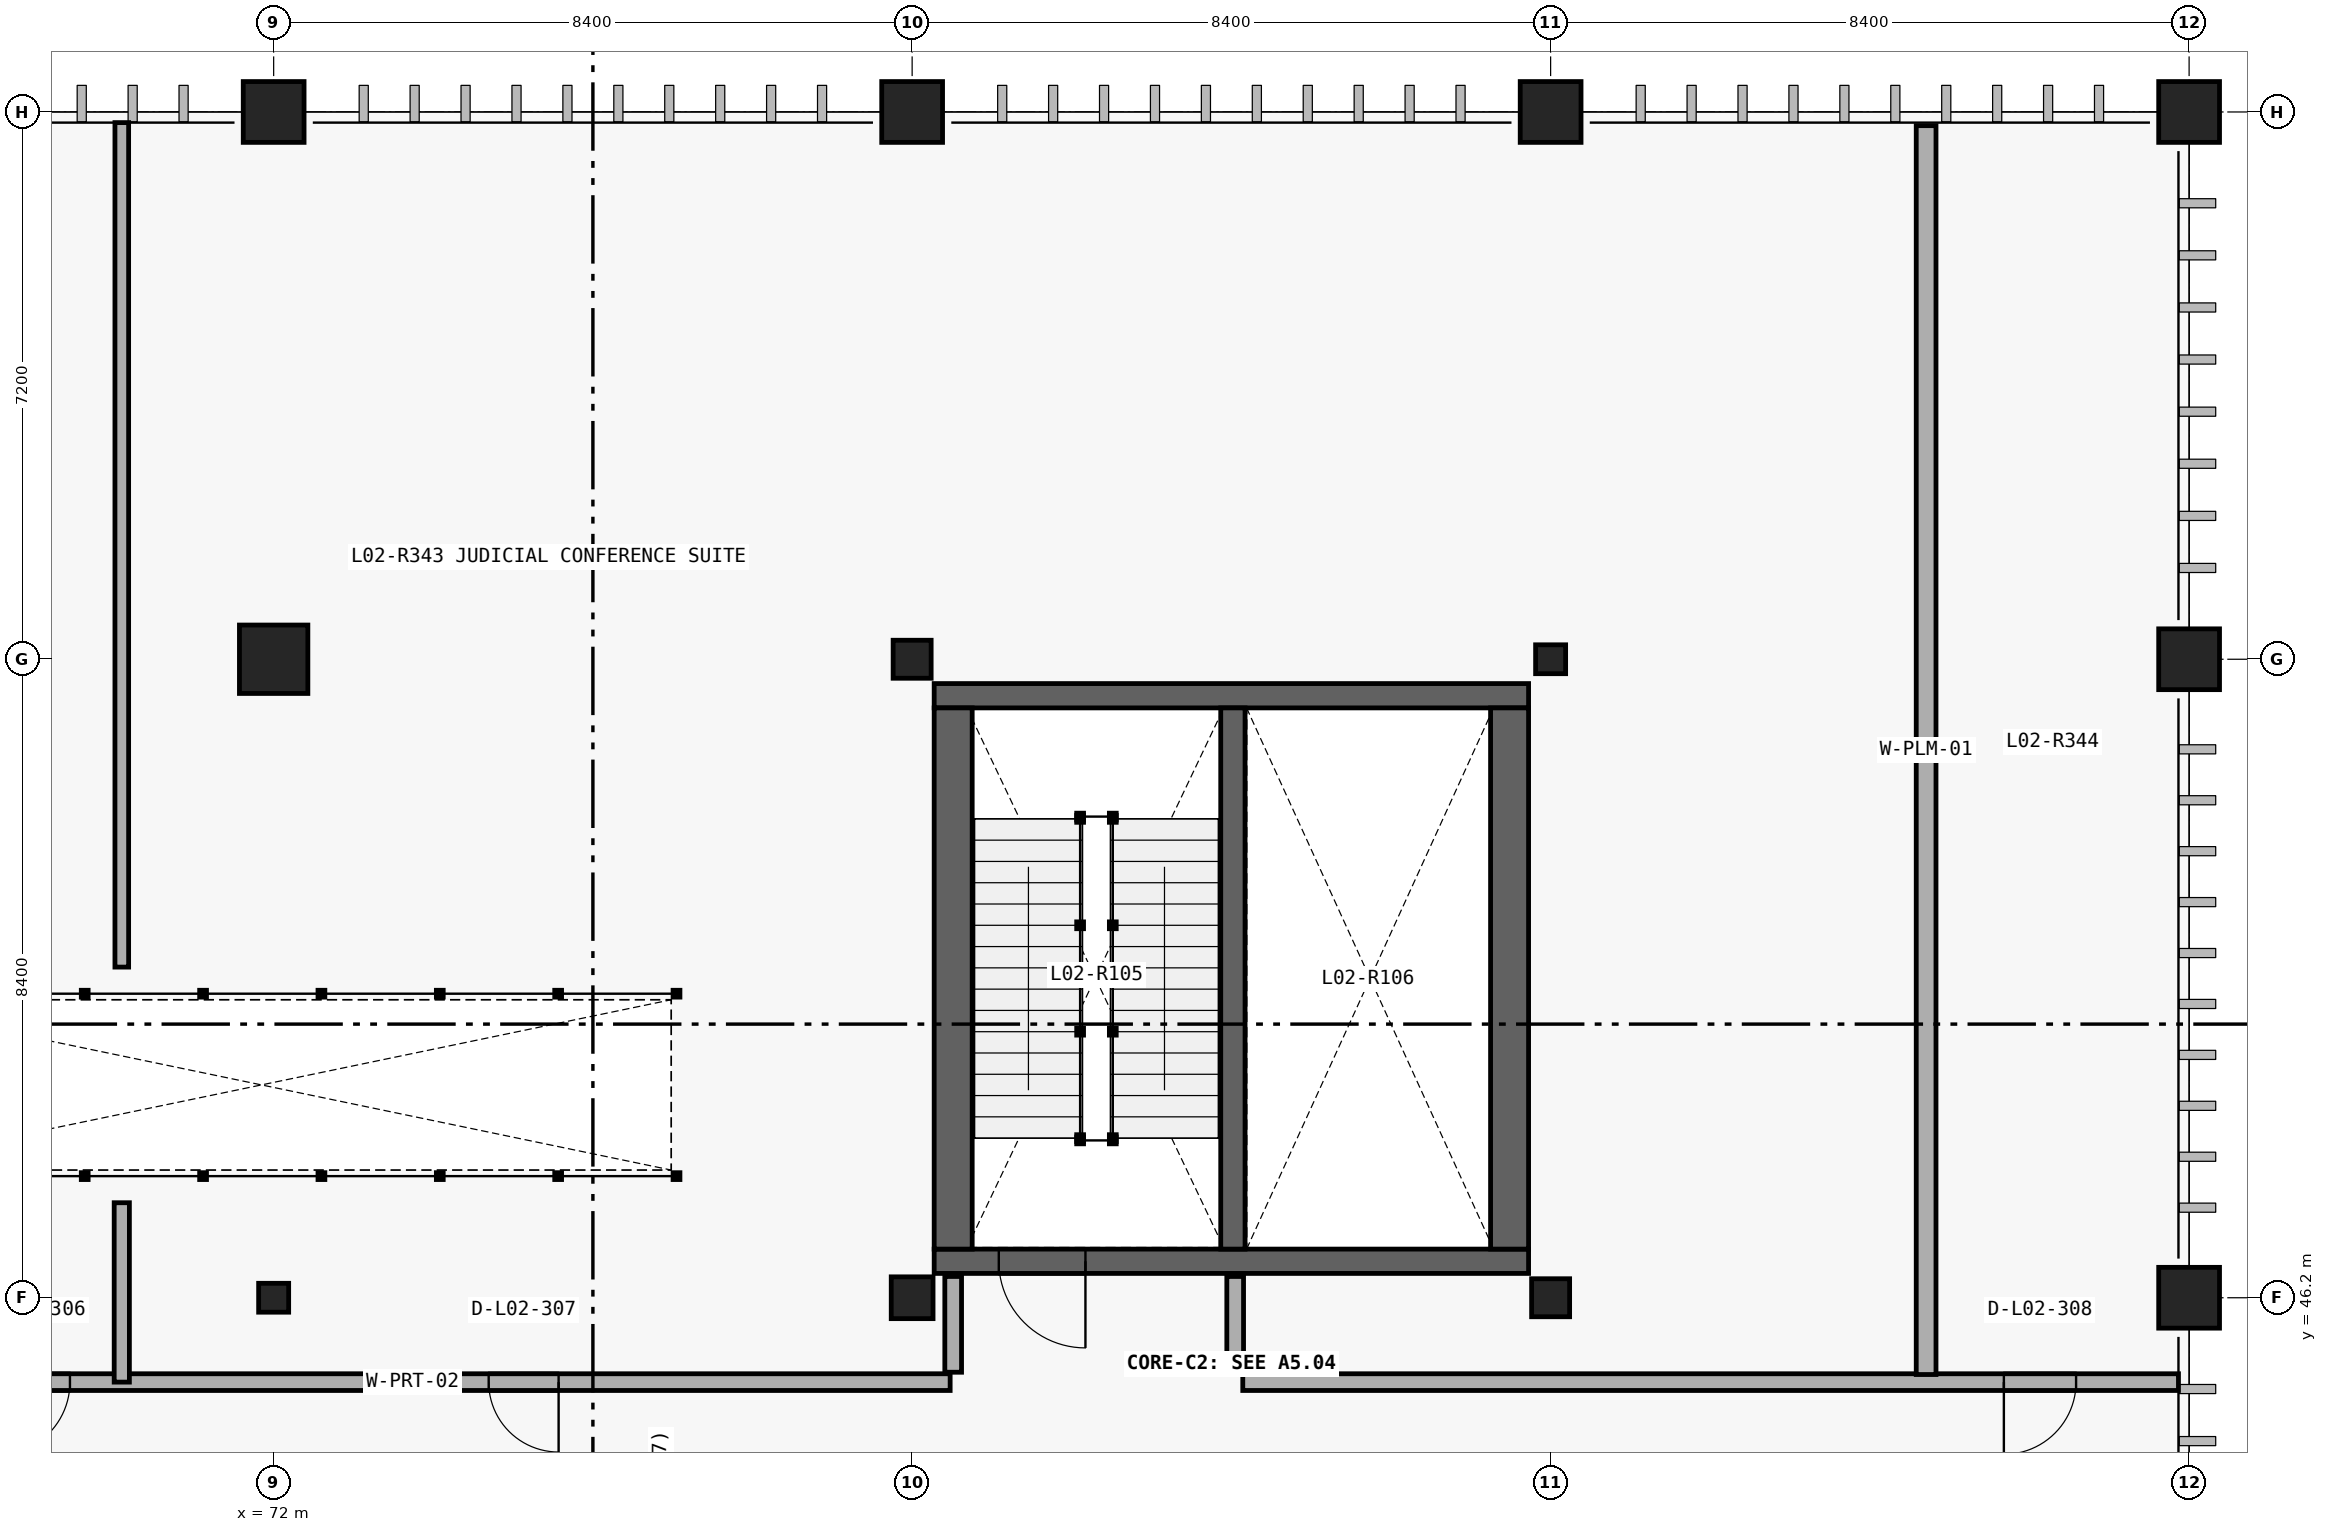
"""IFC4 building model, lengths in metres.
Left out: names, types, materials, properties, quantities, classifications, styles, units other than length and angle.
Written with IfcOpenShell. Run it as: python <this file> out.ifc"""

import sys

from ifc_helpers import new_model, si_unit, direction, frame, frame_2d, origin_with_axes, origin_2d_with_axis, place, context, subcontext, project, spatial, rectangle, circle, i_section, extrude, element, fill, save


model = new_model("IFC4")
c1 = context("Model", 3, precision=1e-05, world=origin_with_axes(), true_north=direction((0.0, 1.0)))
c2 = subcontext(c1, "Body", "Model", "MODEL_VIEW")
j1 = project(units=[si_unit("LENGTHUNIT", "METRE"), si_unit("PLANEANGLEUNIT", "RADIAN")], contexts=[c1])
p1 = place(None, origin_with_axes())
s1 = spatial("IfcSite", under=j1, at=p1, CompositionType="ELEMENT")
p2 = place(p1, origin_with_axes())
s2 = spatial("IfcBuilding", under=s1, at=p2, CompositionType="ELEMENT")
p3 = place(p2, frame((0.0, 0.0, 10.8), z_axis=(0.0, 0.0, 1.0), x_axis=(1.0, 0.0, 0.0)))
s3 = spatial("IfcBuildingStorey", under=s2, at=p3, CompositionType="ELEMENT", Elevation=10.8)
p4 = place(None, frame((80.69, 46.68, 10.8), z_axis=(0.0, 0.0, 1.0), x_axis=(1.0, 0.0, 0.0)))
e1 = element("IfcWall", 1, at=p4, inside=s3, PredefinedType="SHEAR", context=c2, shape_type="SweptSolid", body=[
    extrude(rectangle(XDim=7.82, YDim=0.32, at=frame_2d((3.91, 0.0), x_axis=(1.0, 0.0))), origin_with_axes(), (0.0, 0.0, 1.0), 4.8),
])
p5 = place(None, frame((82.11, 46.68, 10.8), z_axis=(0.0, 0.0, 1.0), x_axis=(1.0, 0.0, 0.0)))
e2 = element("IfcOpeningElement", 2, at=p5, cuts=e1, PredefinedType="OPENING", context=c2, shape_type="SweptSolid", body=[
    extrude(rectangle(XDim=1.14, YDim=2.18, at=frame_2d((0.0, 1.09), x_axis=(1.0, 0.0))), frame((0.0, 0.17, 0.0), z_axis=(0.0, -1.0, 0.0), x_axis=(1.0, 0.0, 0.0)), (0.0, 0.0, 1.0), 0.34),
])
p6 = place(None, frame((88.51, 54.12, 10.8), z_axis=(0.0, 0.0, 1.0), x_axis=(-1.0, 0.0, 0.0)))
e3 = element("IfcWall", 3, at=p6, inside=s3, PredefinedType="SHEAR", context=c2, shape_type="SweptSolid", body=[
    extrude(rectangle(XDim=7.82, YDim=0.32, at=frame_2d((3.91, 0.0), x_axis=(1.0, 0.0))), origin_with_axes(), (0.0, 0.0, 1.0), 4.8),
])
for number, where, z_axis, x_axis in (
    (4, (88.26, 46.84, 10.8), (0.0, 0.0, 1.0), (0.0, 1.0, 0.0)),
    (5, (80.94, 53.96, 10.8), (0.0, 0.0, 1.0), (0.0, -1.0, 0.0)),
):
    element("IfcWall", number, at=place(None, frame(where, z_axis=z_axis, x_axis=x_axis)), inside=s3, PredefinedType="SHEAR", context=c2, shape_type="SweptSolid", body=[
        extrude(rectangle(XDim=7.12, YDim=0.5, at=frame_2d((3.56, 0.0), x_axis=(1.0, 0.0))), origin_with_axes(), (0.0, 0.0, 1.0), 4.8),
    ])
p7 = place(None, frame((84.62, 46.84, 10.8), z_axis=(0.0, 0.0, 1.0), x_axis=(0.0, 1.0, 0.0)))
e6 = element("IfcWall", 6, at=p7, inside=s3, PredefinedType="SHEAR", context=c2, shape_type="SweptSolid", body=[
    extrude(rectangle(XDim=7.12, YDim=0.32, at=frame_2d((3.56, 0.0), x_axis=(1.0, 0.0))), origin_with_axes(), (0.0, 0.0, 1.0), 4.8),
])
for number, where, z_axis, x_axis in (
    (7, (80.94, 45.22, 10.8), (0.0, 0.0, 1.0), (0.0, 1.0, 0.0)),
    (8, (84.65, 45.22, 10.8), (0.0, 0.0, 1.0), (0.0, 1.0, 0.0)),
):
    element("IfcWall", number, at=place(None, frame(where, z_axis=z_axis, x_axis=x_axis)), inside=s3, PredefinedType="PARTITIONING", context=c2, shape_type="SweptSolid", body=[
        extrude(rectangle(XDim=1.26, YDim=0.22, at=frame_2d((0.63, 0.0), x_axis=(1.0, 0.0))), origin_with_axes(), (0.0, 0.0, 1.0), 4.44),
    ])
p8 = place(None, frame((66.755, 45.09, 10.8), z_axis=(0.0, 0.0, 1.0), x_axis=(1.0, 0.0, 0.0)))
e9 = element("IfcWall", 9, at=p8, inside=s3, PredefinedType="PARTITIONING", context=c2, shape_type="SweptSolid", body=[
    extrude(rectangle(XDim=14.145, YDim=0.22, at=frame_2d((7.072, 0.0), x_axis=(1.0, 0.0))), origin_with_axes(), (0.0, 0.0, 1.0), 4.44),
])
p9 = place(None, frame((68.84, 45.09, 10.8), z_axis=(0.0, 0.0, 1.0), x_axis=(1.0, 0.0, 0.0)))
e10 = element("IfcOpeningElement", 10, at=p9, cuts=e9, PredefinedType="OPENING", context=c2, shape_type="SweptSolid", body=[
    extrude(rectangle(XDim=0.96, YDim=2.2, at=frame_2d((0.0, 1.1), x_axis=(1.0, 0.0))), frame((0.0, 0.12, 0.0), z_axis=(0.0, -1.0, 0.0), x_axis=(1.0, 0.0, 0.0)), (0.0, 0.0, 1.0), 0.24),
])
p10 = place(None, frame((75.289, 45.09, 10.8), z_axis=(0.0, 0.0, 1.0), x_axis=(1.0, 0.0, 0.0)))
e11 = element("IfcOpeningElement", 11, at=p10, cuts=e9, PredefinedType="OPENING", context=c2, shape_type="SweptSolid", body=[
    extrude(rectangle(XDim=0.92, YDim=2.14, at=frame_2d((0.0, 1.07), x_axis=(1.0, 0.0))), frame((0.0, 0.12, 0.0), z_axis=(0.0, -1.0, 0.0), x_axis=(1.0, 0.0, 0.0)), (0.0, 0.0, 1.0), 0.24),
])
p11 = place(None, frame((84.75, 45.09, 10.8), z_axis=(0.0, 0.0, 1.0), x_axis=(1.0, 0.0, 0.0)))
e12 = element("IfcWall", 12, at=p11, inside=s3, PredefinedType="PARTITIONING", context=c2, shape_type="SweptSolid", body=[
    extrude(rectangle(XDim=12.31, YDim=0.22, at=frame_2d((6.155, 0.0), x_axis=(1.0, 0.0))), origin_with_axes(), (0.0, 0.0, 1.0), 4.44),
])
p12 = place(None, frame((95.238, 45.09, 10.8), z_axis=(0.0, 0.0, 1.0), x_axis=(1.0, 0.0, 0.0)))
e13 = element("IfcOpeningElement", 13, at=p12, cuts=e12, PredefinedType="OPENING", context=c2, shape_type="SweptSolid", body=[
    extrude(rectangle(XDim=0.95, YDim=2.1, at=frame_2d((0.0, 1.05), x_axis=(1.0, 0.0))), frame((0.0, 0.12, 0.0), z_axis=(0.0, -1.0, 0.0), x_axis=(1.0, 0.0, 0.0)), (0.0, 0.0, 1.0), 0.24),
])
p13 = place(None, frame((93.74, 45.19, 10.8), z_axis=(0.0, 0.0, 1.0), x_axis=(0.0, 1.0, 0.0)))
e14 = element("IfcWall", 14, at=p13, inside=s3, PredefinedType="PLUMBINGWALL", context=c2, shape_type="SweptSolid", body=[
    extrude(rectangle(XDim=16.43, YDim=0.26, at=frame_2d((8.215, 0.0), x_axis=(1.0, 0.0))), origin_with_axes(), (0.0, 0.0, 1.0), 4.44),
])
p14 = place(None, frame((70.002, 45.09, 10.8), z_axis=(0.0, 0.0, 1.0), x_axis=(0.0, 1.0, 0.0)))
e15 = element("IfcWall", 15, at=p14, inside=s3, PredefinedType="PARTITIONING", context=c2, shape_type="SweptSolid", body=[
    extrude(rectangle(XDim=2.36, YDim=0.2, at=frame_2d((1.18, 0.0), x_axis=(1.0, 0.0))), origin_with_axes(), (0.0, 0.0, 1.0), 4.44),
])
p15 = place(None, frame((70.002, 50.55, 10.8), z_axis=(0.0, 0.0, 1.0), x_axis=(0.0, 1.0, 0.0)))
e16 = element("IfcWall", 16, at=p15, inside=s3, PredefinedType="PARTITIONING", context=c2, shape_type="SweptSolid", body=[
    extrude(rectangle(XDim=11.11, YDim=0.18, at=frame_2d((5.555, 0.0), x_axis=(1.0, 0.0))), origin_with_axes(), (0.0, 0.0, 1.0), 4.44),
])
p16 = place(None, frame((72.0, 46.2, 10.8), z_axis=(0.0, 0.0, 1.0), x_axis=(1.0, 0.0, 0.0)))
e17 = element("IfcColumn", 17, at=p16, inside=s3, PredefinedType="COLUMN", context=c2, shape_type="SweptSolid", body=[
    extrude(i_section(OverallWidth=0.395, OverallDepth=0.38, WebThickness=0.019, FlangeThickness=0.03, at=origin_2d_with_axis()), origin_with_axes(), (0.0, 0.0, 1.0), 4.8),
])
p17 = place(None, frame((72.0, 54.6, 10.8), z_axis=(0.0, 0.0, 1.0), x_axis=(1.0, 0.0, 0.0)))
e18 = element("IfcColumn", 18, at=p17, inside=s3, PredefinedType="COLUMN", context=c2, shape_type="SweptSolid", body=[
    extrude(rectangle(XDim=0.9, YDim=0.9, at=origin_2d_with_axis()), origin_with_axes(), (0.0, 0.0, 1.0), 4.8),
])
p18 = place(None, frame((72.0, 61.8, 10.8), z_axis=(0.0, 0.0, 1.0), x_axis=(1.0, 0.0, 0.0)))
e19 = element("IfcColumn", 19, at=p18, inside=s3, PredefinedType="COLUMN", context=c2, shape_type="SweptSolid", body=[
    extrude(circle(Radius=0.4, at=origin_2d_with_axis()), origin_with_axes(), (0.0, 0.0, 1.0), 4.8),
])
p19 = place(None, frame((80.4, 46.2, 10.8), z_axis=(0.0, 0.0, 1.0), x_axis=(1.0, 0.0, 0.0)))
e20 = element("IfcColumn", 20, at=p19, inside=s3, PredefinedType="COLUMN", context=c2, shape_type="SweptSolid", body=[
    extrude(i_section(OverallWidth=0.55, OverallDepth=0.55, WebThickness=0.025, FlangeThickness=0.042, at=origin_2d_with_axis()), origin_with_axes(), (0.0, 0.0, 1.0), 4.8),
])
p20 = place(None, frame((80.4, 54.6, 10.8), z_axis=(0.0, 0.0, 1.0), x_axis=(1.0, 0.0, 0.0)))
e21 = element("IfcColumn", 21, at=p20, inside=s3, PredefinedType="COLUMN", context=c2, shape_type="SweptSolid", body=[
    extrude(i_section(OverallWidth=0.5, OverallDepth=0.5, WebThickness=0.022, FlangeThickness=0.036, at=origin_2d_with_axis()), origin_with_axes(), (0.0, 0.0, 1.0), 4.8),
])
p21 = place(None, frame((80.4, 61.8, 10.8), z_axis=(0.0, 0.0, 1.0), x_axis=(1.0, 0.0, 0.0)))
e22 = element("IfcColumn", 22, at=p21, inside=s3, PredefinedType="COLUMN", context=c2, shape_type="SweptSolid", body=[
    extrude(circle(Radius=0.4, at=origin_2d_with_axis()), origin_with_axes(), (0.0, 0.0, 1.0), 4.8),
])
p22 = place(None, frame((88.8, 46.2, 10.8), z_axis=(0.0, 0.0, 1.0), x_axis=(1.0, 0.0, 0.0)))
e23 = element("IfcColumn", 23, at=p22, inside=s3, PredefinedType="COLUMN", context=c2, shape_type="SweptSolid", body=[
    extrude(i_section(OverallWidth=0.5, OverallDepth=0.5, WebThickness=0.022, FlangeThickness=0.036, at=origin_2d_with_axis()), origin_with_axes(), (0.0, 0.0, 1.0), 4.8),
])
p23 = place(None, frame((88.8, 54.6, 10.8), z_axis=(0.0, 0.0, 1.0), x_axis=(1.0, 0.0, 0.0)))
e24 = element("IfcColumn", 24, at=p23, inside=s3, PredefinedType="COLUMN", context=c2, shape_type="SweptSolid", body=[
    extrude(i_section(OverallWidth=0.395, OverallDepth=0.38, WebThickness=0.019, FlangeThickness=0.03, at=origin_2d_with_axis()), origin_with_axes(), (0.0, 0.0, 1.0), 4.8),
])
for number, where, z_axis, x_axis in (
    (25, (88.8, 61.8, 10.8), (0.0, 0.0, 1.0), (1.0, 0.0, 0.0)),
    (26, (97.2, 46.2, 10.8), (0.0, 0.0, 1.0), (1.0, 0.0, 0.0)),
    (27, (97.2, 54.6, 10.8), (0.0, 0.0, 1.0), (1.0, 0.0, 0.0)),
    (28, (97.2, 61.8, 10.8), (0.0, 0.0, 1.0), (1.0, 0.0, 0.0)),
):
    element("IfcColumn", number, at=place(None, frame(where, z_axis=z_axis, x_axis=x_axis)), inside=s3, PredefinedType="COLUMN", context=c2, shape_type="SweptSolid", body=[
        extrude(circle(Radius=0.4, at=origin_2d_with_axis()), origin_with_axes(), (0.0, 0.0, 1.0), 4.8),
    ])
p24 = place(None, frame((82.11, 46.68, 10.8), z_axis=(0.0, 0.0, 1.0), x_axis=(-1.0, 0.0, 0.0)))
e29 = element("IfcDoor", 29, at=p24, inside=s3, OperationType="SINGLE_SWING_RIGHT", PredefinedType="DOOR", context=c2, shape_type="SweptSolid", body=[
    extrude(rectangle(XDim=1.14, YDim=2.18, at=frame_2d((0.0, 1.09), x_axis=(1.0, 0.0))), frame((0.0, 0.04, 0.0), z_axis=(0.0, -1.0, 0.0), x_axis=(1.0, 0.0, 0.0)), (0.0, 0.0, 1.0), 0.08),
])
fill(e2, e29)
p25 = place(None, frame((68.84, 45.09, 10.8), z_axis=(0.0, 0.0, 1.0), x_axis=(-1.0, 0.0, 0.0)))
e30 = element("IfcDoor", 30, at=p25, inside=s3, OperationType="SINGLE_SWING_LEFT", PredefinedType="DOOR", context=c2, shape_type="SweptSolid", body=[
    extrude(rectangle(XDim=0.96, YDim=2.2, at=frame_2d((0.0, 1.1), x_axis=(1.0, 0.0))), frame((0.0, 0.04, 0.0), z_axis=(0.0, -1.0, 0.0), x_axis=(1.0, 0.0, 0.0)), (0.0, 0.0, 1.0), 0.08),
])
fill(e10, e30)
p26 = place(None, frame((75.289, 45.09, 10.8), z_axis=(0.0, 0.0, 1.0), x_axis=(-1.0, 0.0, 0.0)))
e31 = element("IfcDoor", 31, at=p26, inside=s3, OperationType="SINGLE_SWING_RIGHT", PredefinedType="DOOR", context=c2, shape_type="SweptSolid", body=[
    extrude(rectangle(XDim=0.92, YDim=2.14, at=frame_2d((0.0, 1.07), x_axis=(1.0, 0.0))), frame((0.0, 0.04, 0.0), z_axis=(0.0, -1.0, 0.0), x_axis=(1.0, 0.0, 0.0)), (0.0, 0.0, 1.0), 0.08),
])
fill(e11, e31)
p27 = place(None, frame((95.238, 45.09, 10.8), z_axis=(0.0, 0.0, 1.0), x_axis=(-1.0, 0.0, 0.0)))
e32 = element("IfcDoor", 32, at=p27, inside=s3, OperationType="SINGLE_SWING_LEFT", PredefinedType="DOOR", context=c2, shape_type="SweptSolid", body=[
    extrude(rectangle(XDim=0.95, YDim=2.1, at=frame_2d((0.0, 1.05), x_axis=(1.0, 0.0))), frame((0.0, 0.04, 0.0), z_axis=(0.0, -1.0, 0.0), x_axis=(1.0, 0.0, 0.0)), (0.0, 0.0, 1.0), 0.08),
])
fill(e13, e32)
save(model, sys.argv[1])
